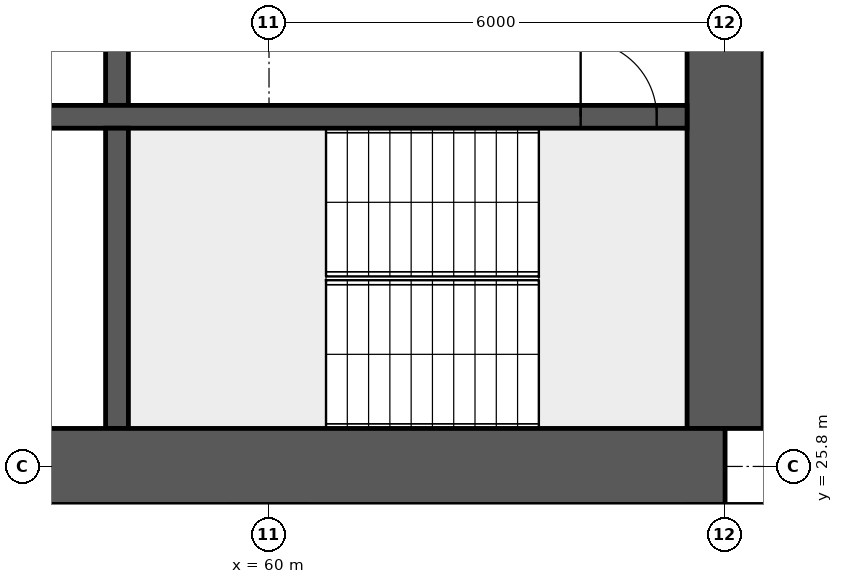
"""IFC4 building model, lengths in metres.
Left out: names, types, materials, properties, quantities, classifications, styles, units other than length and angle.
Written with IfcOpenShell. Run it as: python <this file> out.ifc"""

import sys

from ifc_helpers import new_model, si_unit, direction, frame, frame_2d, origin, place, context, subcontext, project, spatial, rectangle, extrude, element, fill, save


model = new_model("IFC4")
c1 = context("Model", 3, precision=1e-05, world=origin(), true_north=direction((0.0, 1.0)))
c2 = subcontext(c1, "Body", "Model", "MODEL_VIEW")
j1 = project(units=[si_unit("LENGTHUNIT", "METRE"), si_unit("PLANEANGLEUNIT", "RADIAN")], contexts=[c1])
p1 = place(None, origin())
s1 = spatial("IfcSite", under=j1, at=p1, CompositionType="ELEMENT")
p2 = place(p1, origin())
s2 = spatial("IfcBuilding", under=s1, at=p2, CompositionType="ELEMENT")
p3 = place(p2, frame((0.0, 0.0, 27.7)))
s3 = spatial("IfcBuildingStorey", under=s2, at=p3, CompositionType="ELEMENT", Elevation=27.7)
p4 = place(p3, frame((18.0, 25.8, 0.0), z_axis=(0.0, 0.0, 1.0), x_axis=(1.0, 0.0, 0.0)))
e1 = element("IfcWall", 1, at=p4, inside=s3, PredefinedType="SHEAR", context=c2, shape_type="SweptSolid", body=[
    extrude(rectangle(XDim=48.0, YDim=1.0, at=frame_2d((24.0, 0.0))), origin(), (0.0, 0.0, 1.0), 3.75),
])
p5 = place(p3, frame((66.0, 26.3, 0.0), z_axis=(0.0, 0.0, 1.0), x_axis=(0.0, 1.0, 0.0)))
e2 = element("IfcWall", 2, at=p5, inside=s3, PredefinedType="SHEAR", context=c2, shape_type="SweptSolid", body=[
    extrude(rectangle(XDim=11.4, YDim=1.0, at=frame_2d((5.7, 0.0))), origin(), (0.0, 0.0, 1.0), 3.75),
])
p6 = place(p5, frame((5.0, 0.0, 0.0)))
e3 = element("IfcOpeningElement", 3, at=p6, cuts=e2, PredefinedType="OPENING", context=c2, shape_type="SweptSolid", body=[
    extrude(rectangle(XDim=1.2, YDim=2.1, at=frame_2d((0.6, 1.05))), frame((0.0, 0.51, 0.0), z_axis=(0.0, -1.0, 0.0), x_axis=(1.0, 0.0, 0.0)), (0.0, 0.0, 1.0), 1.02),
])
p7 = place(p3, frame((18.5, 30.4, 0.0), z_axis=(0.0, 0.0, 1.0), x_axis=(1.0, 0.0, 0.0)))
e4 = element("IfcWall", 4, at=p7, inside=s3, PredefinedType="SHEAR", context=c2, shape_type="SweptSolid", body=[
    extrude(rectangle(XDim=47.0, YDim=0.3, at=frame_2d((23.5, 0.0))), origin(), (0.0, 0.0, 1.0), 3.75),
])
p8 = place(p7, frame((0.4, 0.0, 0.0)))
e5 = element("IfcOpeningElement", 5, at=p8, cuts=e4, PredefinedType="OPENING", context=c2, shape_type="SweptSolid", body=[
    extrude(rectangle(XDim=1.0, YDim=2.1, at=frame_2d((0.5, 1.05))), frame((0.0, 0.16, 0.0), z_axis=(0.0, -1.0, 0.0), x_axis=(1.0, 0.0, 0.0)), (0.0, 0.0, 1.0), 0.32),
])
p9 = place(p7, frame((45.6, 0.0, 0.0)))
e6 = element("IfcOpeningElement", 6, at=p9, cuts=e4, PredefinedType="OPENING", context=c2, shape_type="SweptSolid", body=[
    extrude(rectangle(XDim=1.0, YDim=2.1, at=frame_2d((0.5, 1.05))), frame((0.0, 0.16, 0.0), z_axis=(0.0, -1.0, 0.0), x_axis=(1.0, 0.0, 0.0)), (0.0, 0.0, 1.0), 0.32),
])
p10 = place(p7, frame((8.25, 0.0, 0.0)))
e7 = element("IfcOpeningElement", 7, at=p10, cuts=e4, PredefinedType="OPENING", context=c2, shape_type="SweptSolid", body=[
    extrude(rectangle(XDim=1.1, YDim=2.1, at=frame_2d((0.55, 1.05))), frame((0.0, 0.16, 0.0), z_axis=(0.0, -1.0, 0.0), x_axis=(1.0, 0.0, 0.0)), (0.0, 0.0, 1.0), 0.32),
])
p11 = place(p7, frame((10.85, 0.0, 0.0)))
e8 = element("IfcOpeningElement", 8, at=p11, cuts=e4, PredefinedType="OPENING", context=c2, shape_type="SweptSolid", body=[
    extrude(rectangle(XDim=1.1, YDim=2.1, at=frame_2d((0.55, 1.05))), frame((0.0, 0.16, 0.0), z_axis=(0.0, -1.0, 0.0), x_axis=(1.0, 0.0, 0.0)), (0.0, 0.0, 1.0), 0.32),
])
p12 = place(p7, frame((13.45, 0.0, 0.0)))
e9 = element("IfcOpeningElement", 9, at=p12, cuts=e4, PredefinedType="OPENING", context=c2, shape_type="SweptSolid", body=[
    extrude(rectangle(XDim=1.1, YDim=2.1, at=frame_2d((0.55, 1.05))), frame((0.0, 0.16, 0.0), z_axis=(0.0, -1.0, 0.0), x_axis=(1.0, 0.0, 0.0)), (0.0, 0.0, 1.0), 0.32),
])
p13 = place(p7, frame((16.05, 0.0, 0.0)))
e10 = element("IfcOpeningElement", 10, at=p13, cuts=e4, PredefinedType="OPENING", context=c2, shape_type="SweptSolid", body=[
    extrude(rectangle(XDim=1.1, YDim=2.1, at=frame_2d((0.55, 1.05))), frame((0.0, 0.16, 0.0), z_axis=(0.0, -1.0, 0.0), x_axis=(1.0, 0.0, 0.0)), (0.0, 0.0, 1.0), 0.32),
])
p14 = place(p7, frame((30.117, 0.0, 0.0)))
e11 = element("IfcOpeningElement", 11, at=p14, cuts=e4, PredefinedType="OPENING", context=c2, shape_type="SweptSolid", body=[
    extrude(rectangle(XDim=1.1, YDim=2.1, at=frame_2d((0.55, 1.05))), frame((0.0, 0.16, 0.0), z_axis=(0.0, -1.0, 0.0), x_axis=(1.0, 0.0, 0.0)), (0.0, 0.0, 1.0), 0.32),
])
p15 = place(p7, frame((33.65, 0.0, 0.0)))
e12 = element("IfcOpeningElement", 12, at=p15, cuts=e4, PredefinedType="OPENING", context=c2, shape_type="SweptSolid", body=[
    extrude(rectangle(XDim=1.1, YDim=2.1, at=frame_2d((0.55, 1.05))), frame((0.0, 0.16, 0.0), z_axis=(0.0, -1.0, 0.0), x_axis=(1.0, 0.0, 0.0)), (0.0, 0.0, 1.0), 0.32),
])
p16 = place(p7, frame((37.183, 0.0, 0.0)))
e13 = element("IfcOpeningElement", 13, at=p16, cuts=e4, PredefinedType="OPENING", context=c2, shape_type="SweptSolid", body=[
    extrude(rectangle(XDim=1.1, YDim=2.1, at=frame_2d((0.55, 1.05))), frame((0.0, 0.16, 0.0), z_axis=(0.0, -1.0, 0.0), x_axis=(1.0, 0.0, 0.0)), (0.0, 0.0, 1.0), 0.32),
])
p17 = place(p3, frame((58.0, 26.3, 0.0), z_axis=(0.0, 0.0, 1.0), x_axis=(0.0, 1.0, 0.0)))
e14 = element("IfcWall", 14, at=p17, inside=s3, PredefinedType="SHEAR", context=c2, shape_type="SweptSolid", body=[
    extrude(rectangle(XDim=3.95, YDim=0.3, at=frame_2d((1.975, 0.0))), origin(), (0.0, 0.0, 1.0), 3.75),
])
p18 = place(p3, frame((58.0, 30.55, 0.0), z_axis=(0.0, 0.0, 1.0), x_axis=(0.0, 1.0, 0.0)))
e15 = element("IfcWall", 15, at=p18, inside=s3, PredefinedType="SHEAR", context=c2, shape_type="SweptSolid", body=[
    extrude(rectangle(XDim=3.9, YDim=0.3, at=frame_2d((1.95, 0.0))), origin(), (0.0, 0.0, 1.0), 3.75),
])
p19 = place(p18, frame((1.4, 0.0, 0.0)))
e16 = element("IfcOpeningElement", 16, at=p19, cuts=e15, PredefinedType="OPENING", context=c2, shape_type="SweptSolid", body=[
    extrude(rectangle(XDim=1.2, YDim=2.1, at=frame_2d((0.6, 1.05))), frame((0.0, 0.16, 0.0), z_axis=(0.0, -1.0, 0.0), x_axis=(1.0, 0.0, 0.0)), (0.0, 0.0, 1.0), 0.32),
])
p20 = place(p3, frame((57.6, 14.9, 0.0), z_axis=(0.0, 0.0, 1.0), x_axis=(0.0, 1.0, 0.0)))
e17 = element("IfcWall", 17, at=p20, inside=s3, PredefinedType="PARTITIONING", context=c2, shape_type="SweptSolid", body=[
    extrude(rectangle(XDim=10.4, YDim=0.15, at=frame_2d((5.2, 0.0))), origin(), (0.0, 0.0, 1.0), 3.5),
])
p21 = place(p9, origin())
e18 = element("IfcDoor", 18, at=p21, inside=s3, OperationType="SINGLE_SWING_LEFT", PredefinedType="DOOR", context=c2, shape_type="SweptSolid", body=[
    extrude(rectangle(XDim=1.0, YDim=2.1, at=frame_2d((0.5, 1.05))), frame((0.0, 0.025, 0.0), z_axis=(0.0, -1.0, 0.0), x_axis=(1.0, 0.0, 0.0)), (0.0, 0.0, 1.0), 0.05),
])
fill(e6, e18)
save(model, sys.argv[1])
